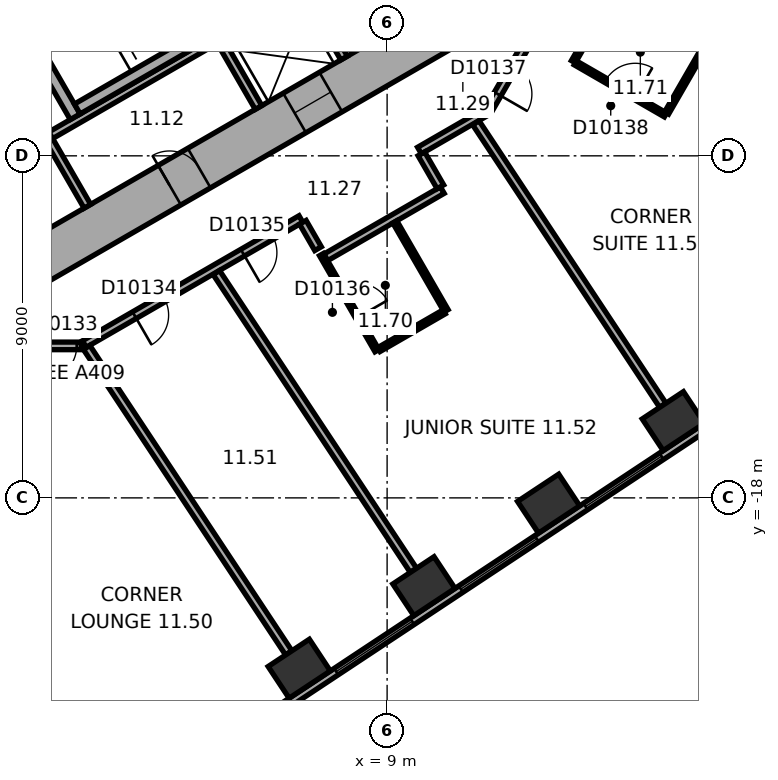
"""IFC4 building model, lengths in metres.
Left out: names, types, materials, properties, quantities, classifications, styles, units other than length and angle.
Written with IfcOpenShell. Run it as: python <this file> out.ifc"""

import sys

from ifc_helpers import new_model, si_unit, direction, frame, frame_2d, origin, origin_2d, place, context, subcontext, project, spatial, rectangle, extrude, element, fill, save


model = new_model("IFC4")
c1 = context("Model", 3, precision=1e-05, world=origin(), true_north=direction((0.0, 1.0)))
c2 = subcontext(c1, "Body", "Model", "MODEL_VIEW")
j1 = project(units=[si_unit("LENGTHUNIT", "METRE"), si_unit("PLANEANGLEUNIT", "RADIAN")], contexts=[c1])
p1 = place(None, origin())
s1 = spatial("IfcSite", under=j1, at=p1, CompositionType="ELEMENT")
p2 = place(p1, origin())
s2 = spatial("IfcBuilding", under=s1, at=p2, CompositionType="ELEMENT")
p3 = place(p2, frame((0.0, 0.0, 57.2)))
s3 = spatial("IfcBuildingStorey", under=s2, at=p3, CompositionType="ELEMENT", Elevation=57.2)
for number, where, z_axis, x_axis in (
    (1, (6.688, -22.496, 0.0), (0.0, 0.0, 1.0), (0.834, 0.552, 0.0)),
    (2, (9.969, -20.324, 0.0), (0.0, 0.0, 1.0), (0.834, 0.552, 0.0)),
    (3, (13.25, -18.152, 0.0), (0.0, 0.0, 1.0), (0.834, 0.552, 0.0)),
    (4, (16.531, -15.981, 0.0), (0.0, 0.0, 1.0), (0.834, 0.552, 0.0)),
):
    element("IfcColumn", number, at=place(p3, frame(where, z_axis=z_axis, x_axis=x_axis)), inside=s3, PredefinedType="COLUMN", context=c2, shape_type="SweptSolid", body=[
        extrude(rectangle(XDim=1.3, YDim=1.0, at=origin_2d()), origin(), (0.0, 0.0, 1.0), 3.3),
    ])
p4 = place(p3, frame((-10.4, -5.658, 0.0), z_axis=(0.0, 0.0, 1.0), x_axis=(0.866021384402, -0.500006961711, 0.0)))
e5 = element("IfcWall", 5, at=p4, inside=s3, PredefinedType="SHEAR", context=c2, shape_type="SweptSolid", body=[
    extrude(rectangle(XDim=12.355, YDim=1.2, at=frame_2d((6.178, 0.0))), origin(), (0.0, 0.0, 1.0), 3.3),
])
p5 = place(p4, frame((6.378, 0.0, 0.0)))
e6 = element("IfcOpeningElement", 6, at=p5, cuts=e5, PredefinedType="OPENING", context=c2, shape_type="SweptSolid", body=[
    extrude(rectangle(XDim=1.5, YDim=2.1, at=frame_2d((0.75, 1.05))), frame((0.0, 0.61, 0.0), z_axis=(0.0, -1.0, 0.0), x_axis=(1.0, 0.0, 0.0)), (0.0, 0.0, 1.0), 1.22),
])
p6 = place(p4, frame((1.928, 0.0, 0.0)))
e7 = element("IfcOpeningElement", 7, at=p6, cuts=e5, PredefinedType="OPENING", context=c2, shape_type="SweptSolid", body=[
    extrude(rectangle(XDim=0.9, YDim=2.1, at=frame_2d((0.45, 1.05))), frame((0.0, 0.61, 0.0), z_axis=(0.0, -1.0, 0.0), x_axis=(1.0, 0.0, 0.0)), (0.0, 0.0, 1.0), 1.22),
])
p7 = place(p4, frame((4.528, 0.0, 0.0)))
e8 = element("IfcOpeningElement", 8, at=p7, cuts=e5, PredefinedType="OPENING", context=c2, shape_type="SweptSolid", body=[
    extrude(rectangle(XDim=0.9, YDim=2.1, at=frame_2d((0.45, 1.05))), frame((0.0, 0.61, 0.0), z_axis=(0.0, -1.0, 0.0), x_axis=(1.0, 0.0, 0.0)), (0.0, 0.0, 1.0), 1.22),
])
p8 = place(p3, frame((-0.3, -11.836, 0.0), z_axis=(0.0, 0.0, 1.0), x_axis=(0.866021384402, 0.500006961711, 0.0)))
e9 = element("IfcWall", 9, at=p8, inside=s3, PredefinedType="SHEAR", context=c2, shape_type="SweptSolid", body=[
    extrude(rectangle(XDim=12.355, YDim=1.2, at=frame_2d((6.178, 0.0))), origin(), (0.0, 0.0, 1.0), 3.3),
])
p9 = place(p8, frame((4.128, 0.0, 0.0)))
e10 = element("IfcOpeningElement", 10, at=p9, cuts=e9, PredefinedType="OPENING", context=c2, shape_type="SweptSolid", body=[
    extrude(rectangle(XDim=0.9, YDim=2.1, at=frame_2d((0.45, 1.05))), frame((0.0, 0.61, 0.0), z_axis=(0.0, -1.0, 0.0), x_axis=(1.0, 0.0, 0.0)), (0.0, 0.0, 1.0), 1.22),
])
p10 = place(p8, frame((7.928, 0.0, 0.0)))
e11 = element("IfcOpeningElement", 11, at=p10, cuts=e9, PredefinedType="OPENING", context=c2, shape_type="SweptSolid", body=[
    extrude(rectangle(XDim=1.1, YDim=2.1, at=frame_2d((0.55, 1.05))), frame((0.0, 0.61, 0.0), z_axis=(0.0, -1.0, 0.0), x_axis=(1.0, 0.0, 0.0)), (0.0, 0.0, 1.0), 1.22),
])
p11 = place(p3, frame((3.083, -25.601, 0.0), z_axis=(0.0, 0.0, 1.0), x_axis=(0.833884295743, 0.551939291329, 0.0)))
e12 = element("IfcWall", 12, at=p11, inside=s3, PredefinedType="STANDARD", context=c2, shape_type="SweptSolid", body=[
    extrude(rectangle(XDim=21.246, YDim=0.2, at=frame_2d((10.623, 0.0))), origin(), (0.0, 0.0, 1.0), 3.3),
])
p12 = place(p11, frame((1.553, 0.0, 0.8)))
e13 = element("IfcOpeningElement", 13, at=p12, cuts=e12, PredefinedType="OPENING", context=c2, shape_type="SweptSolid", body=[
    extrude(rectangle(XDim=2.4, YDim=1.7, at=frame_2d((1.2, 0.85))), frame((0.0, 0.11, 0.0), z_axis=(0.0, -1.0, 0.0), x_axis=(1.0, 0.0, 0.0)), (0.0, 0.0, 1.0), 0.22),
])
p13 = place(p11, frame((5.488, 0.0, 0.8)))
e14 = element("IfcOpeningElement", 14, at=p13, cuts=e12, PredefinedType="OPENING", context=c2, shape_type="SweptSolid", body=[
    extrude(rectangle(XDim=2.4, YDim=1.7, at=frame_2d((1.2, 0.85))), frame((0.0, 0.11, 0.0), z_axis=(0.0, -1.0, 0.0), x_axis=(1.0, 0.0, 0.0)), (0.0, 0.0, 1.0), 0.22),
])
p14 = place(p11, frame((9.422, 0.0, 0.8)))
e15 = element("IfcOpeningElement", 15, at=p14, cuts=e12, PredefinedType="OPENING", context=c2, shape_type="SweptSolid", body=[
    extrude(rectangle(XDim=2.4, YDim=1.7, at=frame_2d((1.2, 0.85))), frame((0.0, 0.11, 0.0), z_axis=(0.0, -1.0, 0.0), x_axis=(1.0, 0.0, 0.0)), (0.0, 0.0, 1.0), 0.22),
])
p15 = place(p11, frame((13.357, 0.0, 0.8)))
e16 = element("IfcOpeningElement", 16, at=p15, cuts=e12, PredefinedType="OPENING", context=c2, shape_type="SweptSolid", body=[
    extrude(rectangle(XDim=2.4, YDim=1.7, at=frame_2d((1.2, 0.85))), frame((0.0, 0.11, 0.0), z_axis=(0.0, -1.0, 0.0), x_axis=(1.0, 0.0, 0.0)), (0.0, 0.0, 1.0), 0.22),
])
p16 = place(p11, frame((17.291, 0.0, 0.8)))
e17 = element("IfcOpeningElement", 17, at=p16, cuts=e12, PredefinedType="OPENING", context=c2, shape_type="SweptSolid", body=[
    extrude(rectangle(XDim=2.4, YDim=1.7, at=frame_2d((1.2, 0.85))), frame((0.0, 0.11, 0.0), z_axis=(0.0, -1.0, 0.0), x_axis=(1.0, 0.0, 0.0)), (0.0, 0.0, 1.0), 0.22),
])
p17 = place(p3, frame((-0.024, -8.559, 0.0), z_axis=(0.0, 0.0, 1.0), x_axis=(0.866026010844, 0.49999894854, 0.0)))
e18 = element("IfcWall", 18, at=p17, inside=s3, PredefinedType="PARTITIONING", context=c2, shape_type="SweptSolid", body=[
    extrude(rectangle(XDim=8.0, YDim=0.2, at=frame_2d((4.0, 0.0))), origin(), (0.0, 0.0, 1.0), 3.05),
])
for number, where, z_axis, x_axis in (
    (19, (0.013, -8.422, 0.0), (0.0, 0.0, 1.0), (0.5, -0.866, 0.0)),
    (20, (4.516, -5.822, 0.0), (0.0, 0.0, 1.0), (0.5, -0.866, 0.0)),
    (21, (6.768, -4.522, 0.0), (0.0, 0.0, 1.0), (0.5, -0.866, 0.0)),
):
    element("IfcWall", number, at=place(p3, frame(where, z_axis=z_axis, x_axis=x_axis)), inside=s3, PredefinedType="PARTITIONING", context=c2, shape_type="SweptSolid", body=[
        extrude(rectangle(XDim=2.2, YDim=0.2, at=frame_2d((1.1, 0.0))), origin(), (0.0, 0.0, 1.0), 3.05),
    ])
p18 = place(p3, frame((-1.558, -3.902, 0.0), z_axis=(0.0, 0.0, 1.0), x_axis=(0.499977259774, -0.866038532462, 0.0)))
e22 = element("IfcWall", 22, at=p18, inside=s3, PredefinedType="SHEAR", context=c2, shape_type="SweptSolid", body=[
    extrude(rectangle(XDim=4.7, YDim=0.3, at=frame_2d((2.35, 0.0))), origin(), (0.0, 0.0, 1.0), 3.05),
])
p19 = place(p18, frame((0.8, 0.0, 0.0)))
e23 = element("IfcOpeningElement", 23, at=p19, cuts=e22, PredefinedType="OPENING", context=c2, shape_type="SweptSolid", body=[
    extrude(rectangle(XDim=1.2, YDim=2.1, at=frame_2d((0.6, 1.05))), frame((0.0, 0.16, 0.0), z_axis=(0.0, -1.0, 0.0), x_axis=(1.0, 0.0, 0.0)), (0.0, 0.0, 1.0), 0.32),
])
p20 = place(p3, frame((0.847, -7.767, 0.0), z_axis=(0.0, 0.0, 1.0), x_axis=(0.866027801685, 0.499995846692, 0.0)))
e24 = element("IfcWall", 24, at=p20, inside=s3, PredefinedType="SHEAR", context=c2, shape_type="SweptSolid", body=[
    extrude(rectangle(XDim=7.06, YDim=0.3, at=frame_2d((3.53, 0.0))), origin(), (0.0, 0.0, 1.0), 3.05),
])
p21 = place(p3, frame((-0.186, -14.001, 0.0), z_axis=(0.0, 0.0, 1.0), x_axis=(1.0, 0.0, 0.0)))
e25 = element("IfcWall", 25, at=p21, inside=s3, PredefinedType="PARTITIONING", context=c2, shape_type="SweptSolid", body=[
    extrude(rectangle(XDim=1.136, YDim=0.2, at=frame_2d((0.568, 0.0))), origin(), (0.0, 0.0, 1.0), 3.05),
])
p22 = place(p21, frame((0.118, 0.0, 0.0)))
e26 = element("IfcOpeningElement", 26, at=p22, cuts=e25, PredefinedType="OPENING", context=c2, shape_type="SweptSolid", body=[
    extrude(rectangle(XDim=0.9, YDim=2.1, at=frame_2d((0.45, 1.05))), frame((0.0, 0.11, 0.0), z_axis=(0.0, -1.0, 0.0), x_axis=(1.0, 0.0, 0.0)), (0.0, 0.0, 1.0), 0.22),
])
p23 = place(p3, frame((1.033, -13.953, 0.0), z_axis=(0.0, 0.0, 1.0), x_axis=(0.866017531406, 0.500013635111, 0.0)))
e27 = element("IfcWall", 27, at=p23, inside=s3, PredefinedType="PARTITIONING", context=c2, shape_type="SweptSolid", body=[
    extrude(rectangle(XDim=6.58, YDim=0.2, at=frame_2d((3.29, 0.0))), origin(), (0.0, 0.0, 1.0), 3.05),
])
p24 = place(p23, frame((1.521, 0.0, 0.0)))
e28 = element("IfcOpeningElement", 28, at=p24, cuts=e27, PredefinedType="OPENING", context=c2, shape_type="SweptSolid", body=[
    extrude(rectangle(XDim=0.9, YDim=2.1, at=frame_2d((0.45, 1.05))), frame((0.0, 0.11, 0.0), z_axis=(0.0, -1.0, 0.0), x_axis=(1.0, 0.0, 0.0)), (0.0, 0.0, 1.0), 0.22),
])
p25 = place(p23, frame((4.811, 0.0, 0.0)))
e29 = element("IfcOpeningElement", 29, at=p25, cuts=e27, PredefinedType="OPENING", context=c2, shape_type="SweptSolid", body=[
    extrude(rectangle(XDim=0.9, YDim=2.1, at=frame_2d((0.45, 1.05))), frame((0.0, 0.11, 0.0), z_axis=(0.0, -1.0, 0.0), x_axis=(1.0, 0.0, 0.0)), (0.0, 0.0, 1.0), 0.22),
])
p26 = place(p3, frame((6.412, -22.079, 0.0), z_axis=(0.0, 0.0, 1.0), x_axis=(-0.551919507115, 0.83389739037, 0.0)))
e30 = element("IfcWall", 30, at=p26, inside=s3, PredefinedType="PARTITIONING", context=c2, shape_type="SweptSolid", body=[
    extrude(rectangle(XDim=9.635, YDim=0.2, at=frame_2d((4.817, 0.0))), origin(), (0.0, 0.0, 1.0), 3.05),
])
p27 = place(p3, frame((6.782, -10.749, 0.0), z_axis=(0.0, 0.0, 1.0), x_axis=(0.500170954823, -0.865926680471, 0.0)))
e31 = element("IfcWall", 31, at=p27, inside=s3, PredefinedType="PARTITIONING", context=c2, shape_type="SweptSolid", body=[
    extrude(rectangle(XDim=0.801, YDim=0.2, at=frame_2d((0.4, 0.0))), origin(), (0.0, 0.0, 1.0), 3.05),
])
p28 = place(p3, frame((7.385, -11.673, 0.0), z_axis=(0.0, 0.0, 1.0), x_axis=(0.866037524642, 0.499979005472, 0.0)))
e32 = element("IfcWall", 32, at=p28, inside=s3, PredefinedType="PARTITIONING", context=c2, shape_type="SweptSolid", body=[
    extrude(rectangle(XDim=3.542, YDim=0.2, at=frame_2d((1.771, 0.0))), origin(), (0.0, 0.0, 1.0), 3.05),
])
p29 = place(p3, frame((8.733, -14.127, 0.0), z_axis=(0.0, 0.0, 1.0), x_axis=(-0.499978132246, 0.86603802877, 0.0)))
e33 = element("IfcWall", 33, at=p29, inside=s3, PredefinedType="PARTITIONING", context=c2, shape_type="SweptSolid", body=[
    extrude(rectangle(XDim=2.921, YDim=0.12, at=frame_2d((1.46, 0.0))), origin(), (0.0, 0.0, 1.0), 3.05),
])
p30 = place(p29, frame((1.01, 0.0, 0.0)))
e34 = element("IfcOpeningElement", 34, at=p30, cuts=e33, PredefinedType="OPENING", context=c2, shape_type="SweptSolid", body=[
    extrude(rectangle(XDim=0.9, YDim=2.1, at=frame_2d((0.45, 1.05))), frame((0.0, 0.07, 0.0), z_axis=(0.0, -1.0, 0.0), x_axis=(1.0, 0.0, 0.0)), (0.0, 0.0, 1.0), 0.14),
])
p31 = place(p3, frame((9.203, -10.738, 0.0), z_axis=(0.0, 0.0, 1.0), x_axis=(0.50000943426, -0.866019956843, 0.0)))
e35 = element("IfcWall", 35, at=p31, inside=s3, PredefinedType="PARTITIONING", context=c2, shape_type="SweptSolid", body=[
    extrude(rectangle(XDim=2.7, YDim=0.12, at=frame_2d((1.35, 0.0))), origin(), (0.0, 0.0, 1.0), 3.05),
])
p32 = place(p3, frame((9.693, -19.907, 0.0), z_axis=(0.0, 0.0, 1.0), x_axis=(-0.551938394837, 0.833884889121, 0.0)))
e36 = element("IfcWall", 36, at=p32, inside=s3, PredefinedType="PARTITIONING", context=c2, shape_type="SweptSolid", body=[
    extrude(rectangle(XDim=9.394, YDim=0.2, at=frame_2d((4.697, 0.0))), origin(), (0.0, 0.0, 1.0), 2.6),
])
p33 = place(p3, frame((9.852, -8.861, 0.0), z_axis=(0.0, 0.0, 1.0), x_axis=(0.866013291437, 0.500020978615, 0.0)))
e37 = element("IfcWall", 37, at=p33, inside=s3, PredefinedType="PARTITIONING", context=c2, shape_type="SweptSolid", body=[
    extrude(rectangle(XDim=2.077, YDim=0.2, at=frame_2d((1.038, 0.0))), origin(), (0.0, 0.0, 1.0), 3.05),
])
p34 = place(p3, frame((10.402, -9.815, 0.0), z_axis=(0.0, 0.0, 1.0), x_axis=(-0.499968756647, 0.866043441391, 0.0)))
e38 = element("IfcWall", 38, at=p34, inside=s3, PredefinedType="PARTITIONING", context=c2, shape_type="SweptSolid", body=[
    extrude(rectangle(XDim=1.001, YDim=0.2, at=frame_2d((0.5, 0.0))), origin(), (0.0, 0.0, 1.0), 3.05),
])
p35 = place(p3, frame((10.501, -13.106, 0.0), z_axis=(0.0, 0.0, 1.0), x_axis=(-0.866013262469, -0.500021028785, 0.0)))
e39 = element("IfcWall", 39, at=p35, inside=s3, PredefinedType="PARTITIONING", context=c2, shape_type="SweptSolid", body=[
    extrude(rectangle(XDim=1.982, YDim=0.12, at=frame_2d((0.991, 0.0))), origin(), (0.0, 0.0, 1.0), 3.05),
])
p36 = place(p3, frame((11.67, -7.788, 0.0), z_axis=(0.0, 0.0, 1.0), x_axis=(0.500063286585, 0.865988862174, 0.0)))
e40 = element("IfcWall", 40, at=p36, inside=s3, PredefinedType="PARTITIONING", context=c2, shape_type="SweptSolid", body=[
    extrude(rectangle(XDim=1.86, YDim=0.2, at=frame_2d((0.93, 0.0))), origin(), (0.0, 0.0, 1.0), 3.05),
])
p37 = place(p36, frame((0.48, 0.0, 0.0)))
e41 = element("IfcOpeningElement", 41, at=p37, cuts=e40, PredefinedType="OPENING", context=c2, shape_type="SweptSolid", body=[
    extrude(rectangle(XDim=0.9, YDim=2.1, at=frame_2d((0.45, 1.05))), frame((0.0, 0.11, 0.0), z_axis=(0.0, -1.0, 0.0), x_axis=(1.0, 0.0, 0.0)), (0.0, 0.0, 1.0), 0.22),
])
p38 = place(p3, frame((13.901, -6.524, 0.0), z_axis=(0.0, 0.0, 1.0), x_axis=(0.499964162598, 0.86604609353, 0.0)))
e42 = element("IfcWall", 42, at=p38, inside=s3, PredefinedType="PARTITIONING", context=c2, shape_type="SweptSolid", body=[
    extrude(rectangle(XDim=1.661, YDim=0.12, at=frame_2d((0.831, 0.0))), origin(), (0.0, 0.0, 1.0), 3.05),
])
p39 = place(p3, frame((16.255, -15.564, 0.0), z_axis=(0.0, 0.0, 1.0), x_axis=(-0.55192208744, 0.833895682562, 0.0)))
e43 = element("IfcWall", 43, at=p39, inside=s3, PredefinedType="PARTITIONING", context=c2, shape_type="SweptSolid", body=[
    extrude(rectangle(XDim=8.913, YDim=0.2, at=frame_2d((4.457, 0.0))), origin(), (0.0, 0.0, 1.0), 2.6),
])
p40 = place(p3, frame((16.326, -7.925, 0.0), z_axis=(0.0, 0.0, 1.0), x_axis=(-0.865997131366, 0.500048966069, 0.0)))
e44 = element("IfcWall", 44, at=p40, inside=s3, PredefinedType="PARTITIONING", context=c2, shape_type="SweptSolid", body=[
    extrude(rectangle(XDim=2.74, YDim=0.12, at=frame_2d((1.37, 0.0))), origin(), (0.0, 0.0, 1.0), 3.05),
])
p41 = place(p40, frame((0.92, 0.0, 0.0)))
e45 = element("IfcOpeningElement", 45, at=p41, cuts=e44, PredefinedType="OPENING", context=c2, shape_type="SweptSolid", body=[
    extrude(rectangle(XDim=0.9, YDim=2.1, at=frame_2d((0.45, 1.05))), frame((0.0, 0.07, 0.0), z_axis=(0.0, -1.0, 0.0), x_axis=(1.0, 0.0, 0.0)), (0.0, 0.0, 1.0), 0.14),
])
p42 = place(p3, frame((17.396, -6.071, 0.0), z_axis=(0.0, 0.0, 1.0), x_axis=(-0.500027264788, -0.866009661879, 0.0)))
e46 = element("IfcWall", 46, at=p42, inside=s3, PredefinedType="PARTITIONING", context=c2, shape_type="SweptSolid", body=[
    extrude(rectangle(XDim=2.08, YDim=0.12, at=frame_2d((1.04, 0.0))), origin(), (0.0, 0.0, 1.0), 3.05),
])
p43 = place(p13, origin())
e47 = element("IfcWindow", 47, at=p43, inside=s3, PartitioningType="SINGLE_PANEL", PredefinedType="WINDOW", context=c2, shape_type="SweptSolid", body=[
    extrude(rectangle(XDim=2.4, YDim=1.7, at=frame_2d((1.2, 0.85))), frame((0.0, 0.03, 0.0), z_axis=(0.0, -1.0, 0.0), x_axis=(1.0, 0.0, 0.0)), (0.0, 0.0, 1.0), 0.06),
])
fill(e14, e47)
p44 = place(p14, origin())
e48 = element("IfcWindow", 48, at=p44, inside=s3, PartitioningType="SINGLE_PANEL", PredefinedType="WINDOW", context=c2, shape_type="SweptSolid", body=[
    extrude(rectangle(XDim=2.4, YDim=1.7, at=frame_2d((1.2, 0.85))), frame((0.0, 0.03, 0.0), z_axis=(0.0, -1.0, 0.0), x_axis=(1.0, 0.0, 0.0)), (0.0, 0.0, 1.0), 0.06),
])
fill(e15, e48)
p45 = place(p15, origin())
e49 = element("IfcWindow", 49, at=p45, inside=s3, PartitioningType="SINGLE_PANEL", PredefinedType="WINDOW", context=c2, shape_type="SweptSolid", body=[
    extrude(rectangle(XDim=2.4, YDim=1.7, at=frame_2d((1.2, 0.85))), frame((0.0, 0.03, 0.0), z_axis=(0.0, -1.0, 0.0), x_axis=(1.0, 0.0, 0.0)), (0.0, 0.0, 1.0), 0.06),
])
fill(e16, e49)
p46 = place(p9, origin())
e50 = element("IfcDoor", 50, at=p46, inside=s3, OperationType="SINGLE_SWING_LEFT", PredefinedType="DOOR", context=c2, shape_type="SweptSolid", body=[
    extrude(rectangle(XDim=0.9, YDim=2.1, at=frame_2d((0.45, 1.05))), frame((0.0, 0.025, 0.0), z_axis=(0.0, -1.0, 0.0), x_axis=(1.0, 0.0, 0.0)), (0.0, 0.0, 1.0), 0.05),
])
fill(e10, e50)
p47 = place(p10, origin())
e51 = element("IfcDoor", 51, at=p47, inside=s3, OperationType="DOUBLE_DOOR_SLIDING", PredefinedType="DOOR", context=c2, shape_type="SweptSolid", body=[
    extrude(rectangle(XDim=1.1, YDim=2.1, at=frame_2d((0.55, 1.05))), frame((0.0, 0.025, 0.0), z_axis=(0.0, -1.0, 0.0), x_axis=(1.0, 0.0, 0.0)), (0.0, 0.0, 1.0), 0.05),
])
fill(e11, e51)
p48 = place(p22, origin())
e52 = element("IfcDoor", 52, at=p48, inside=s3, OperationType="SINGLE_SWING_LEFT", PredefinedType="DOOR", context=c2, shape_type="SweptSolid", body=[
    extrude(rectangle(XDim=0.9, YDim=2.1, at=frame_2d((0.45, 1.05))), frame((0.0, 0.025, 0.0), z_axis=(0.0, -1.0, 0.0), x_axis=(1.0, 0.0, 0.0)), (0.0, 0.0, 1.0), 0.05),
])
fill(e26, e52)
p49 = place(p24, origin())
e53 = element("IfcDoor", 53, at=p49, inside=s3, OperationType="SINGLE_SWING_LEFT", PredefinedType="DOOR", context=c2, shape_type="SweptSolid", body=[
    extrude(rectangle(XDim=0.9, YDim=2.1, at=frame_2d((0.45, 1.05))), frame((0.0, 0.025, 0.0), z_axis=(0.0, -1.0, 0.0), x_axis=(1.0, 0.0, 0.0)), (0.0, 0.0, 1.0), 0.05),
])
fill(e28, e53)
p50 = place(p25, origin())
e54 = element("IfcDoor", 54, at=p50, inside=s3, OperationType="SINGLE_SWING_LEFT", PredefinedType="DOOR", context=c2, shape_type="SweptSolid", body=[
    extrude(rectangle(XDim=0.9, YDim=2.1, at=frame_2d((0.45, 1.05))), frame((0.0, 0.025, 0.0), z_axis=(0.0, -1.0, 0.0), x_axis=(1.0, 0.0, 0.0)), (0.0, 0.0, 1.0), 0.05),
])
fill(e29, e54)
p51 = place(p30, origin())
e55 = element("IfcDoor", 55, at=p51, inside=s3, OperationType="SINGLE_SWING_LEFT", PredefinedType="DOOR", context=c2, shape_type="SweptSolid", body=[
    extrude(rectangle(XDim=0.9, YDim=2.1, at=frame_2d((0.45, 1.05))), frame((0.0, 0.025, 0.0), z_axis=(0.0, -1.0, 0.0), x_axis=(1.0, 0.0, 0.0)), (0.0, 0.0, 1.0), 0.05),
])
fill(e34, e55)
p52 = place(p37, origin())
e56 = element("IfcDoor", 56, at=p52, inside=s3, OperationType="SINGLE_SWING_LEFT", PredefinedType="DOOR", context=c2, shape_type="SweptSolid", body=[
    extrude(rectangle(XDim=0.9, YDim=2.1, at=frame_2d((0.45, 1.05))), frame((0.0, 0.025, 0.0), z_axis=(0.0, -1.0, 0.0), x_axis=(1.0, 0.0, 0.0)), (0.0, 0.0, 1.0), 0.05),
])
fill(e41, e56)
p53 = place(p41, origin())
e57 = element("IfcDoor", 57, at=p53, inside=s3, OperationType="SINGLE_SWING_LEFT", PredefinedType="DOOR", context=c2, shape_type="SweptSolid", body=[
    extrude(rectangle(XDim=0.9, YDim=2.1, at=frame_2d((0.45, 1.05))), frame((0.0, 0.025, 0.0), z_axis=(0.0, -1.0, 0.0), x_axis=(1.0, 0.0, 0.0)), (0.0, 0.0, 1.0), 0.05),
])
fill(e45, e57)
save(model, sys.argv[1])
